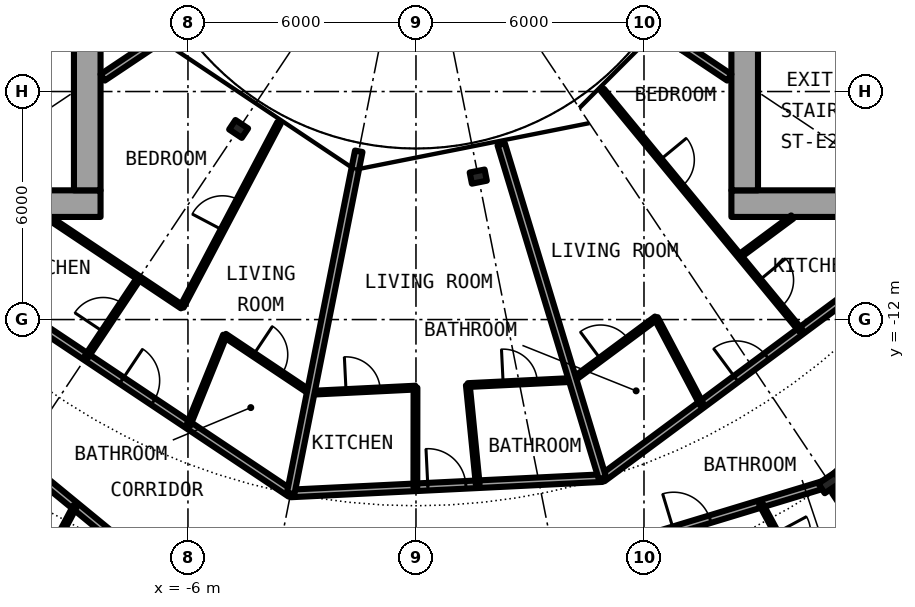
"""IFC4 building model, lengths in metres.
Left out: names, types, materials, properties, quantities, classifications, styles, units other than length and angle.
Written with IfcOpenShell. Run it as: python <this file> out.ifc"""

import sys

from ifc_helpers import new_model, si_unit, direction, frame, frame_2d, origin, origin_2d, place, context, subcontext, project, spatial, rectangle, i_section, extrude, element, fill, save


model = new_model("IFC4")
c1 = context("Model", 3, precision=1e-05, world=origin(), true_north=direction((0.0, 1.0)))
c2 = subcontext(c1, "Body", "Model", "MODEL_VIEW")
j1 = project(units=[si_unit("LENGTHUNIT", "METRE"), si_unit("PLANEANGLEUNIT", "RADIAN")], contexts=[c1])
p1 = place(None, origin())
s1 = spatial("IfcSite", under=j1, at=p1, CompositionType="ELEMENT")
p2 = place(p1, origin())
s2 = spatial("IfcBuilding", under=s1, at=p2, CompositionType="ELEMENT")
p3 = place(p2, frame((0.0, 0.0, 91.05)))
s3 = spatial("IfcBuildingStorey", under=s2, at=p3, CompositionType="ELEMENT", Elevation=91.05)
p4 = place(p3, frame((10.889, -16.297, 0.0), z_axis=(0.0, 0.0, 1.0), x_axis=(0.55557023302, -0.831469612303, 0.0)))
e1 = element("IfcColumn", 1, at=p4, inside=s3, PredefinedType="COLUMN", context=c2, shape_type="SweptSolid", body=[
    extrude(i_section(OverallWidth=0.306, OverallDepth=0.524, WebThickness=0.021, FlangeThickness=0.04, FilletRadius=0.027, at=origin_2d()), origin(), (0.0, 0.0, 1.0), 3.05),
])
for number, where, z_axis, x_axis in (
    (2, (-4.667, -6.984, 0.0), (0.0, 0.0, 1.0), (-0.556, -0.831, 0.0)),
    (3, (1.639, -8.239, 0.0), (0.0, 0.0, 1.0), (0.195, -0.981, 0.0)),
):
    element("IfcColumn", number, at=place(p3, frame(where, z_axis=z_axis, x_axis=x_axis)), inside=s3, PredefinedType="COLUMN", context=c2, shape_type="SweptSolid", body=[
        extrude(i_section(OverallWidth=0.3, OverallDepth=0.4, WebThickness=0.013, FlangeThickness=0.024, FilletRadius=0.027, at=origin_2d()), origin(), (0.0, 0.0, 1.0), 3.05),
    ])
p5 = place(p3, frame((8.3, -8.95, 0.0), z_axis=(0.0, 0.0, 1.0), x_axis=(1.0, 0.0, 0.0)))
e4 = element("IfcWall", 4, at=p5, inside=s3, PredefinedType="SHEAR", context=c2, shape_type="SweptSolid", body=[
    extrude(rectangle(XDim=14.0, YDim=0.7, at=frame_2d((7.0, 0.0))), origin(), (0.0, 0.0, 1.0), 3.05),
])
p6 = place(p5, frame((11.575, 0.0, 0.0)))
e5 = element("IfcOpeningElement", 5, at=p6, cuts=e4, PredefinedType="OPENING", context=c2, shape_type="SweptSolid", body=[
    extrude(rectangle(XDim=1.2, YDim=2.3, at=frame_2d((0.6, 1.15))), frame((0.0, 0.36, 0.0), z_axis=(0.0, -1.0, 0.0), x_axis=(1.0, 0.0, 0.0)), (0.0, 0.0, 1.0), 0.72),
])
p7 = place(p3, frame((8.65, -8.6, 0.0), z_axis=(0.0, 0.0, 1.0), x_axis=(0.0, 1.0, 0.0)))
e6 = element("IfcWall", 6, at=p7, inside=s3, PredefinedType="SHEAR", context=c2, shape_type="SweptSolid", body=[
    extrude(rectangle(XDim=17.2, YDim=0.7, at=frame_2d((8.6, 0.0))), origin(), (0.0, 0.0, 1.0), 3.05),
])
p8 = place(p7, frame((7.4, 0.0, 0.1)))
e7 = element("IfcOpeningElement", 7, at=p8, cuts=e6, PredefinedType="OPENING", context=c2, shape_type="SweptSolid", body=[
    extrude(rectangle(XDim=2.4, YDim=2.2, at=frame_2d((1.2, 1.1))), frame((0.0, 0.36, 0.0), z_axis=(0.0, -1.0, 0.0), x_axis=(1.0, 0.0, 0.0)), (0.0, 0.0, 1.0), 0.72),
])
p9 = place(p3, frame((-22.3, -8.95, 0.0), z_axis=(0.0, 0.0, 1.0), x_axis=(1.0, 0.0, 0.0)))
e8 = element("IfcWall", 8, at=p9, inside=s3, PredefinedType="SHEAR", context=c2, shape_type="SweptSolid", body=[
    extrude(rectangle(XDim=14.0, YDim=0.7, at=frame_2d((7.0, 0.0))), origin(), (0.0, 0.0, 1.0), 3.05),
])
p10 = place(p9, frame((1.225, 0.0, 0.0)))
e9 = element("IfcOpeningElement", 9, at=p10, cuts=e8, PredefinedType="OPENING", context=c2, shape_type="SweptSolid", body=[
    extrude(rectangle(XDim=1.2, YDim=2.3, at=frame_2d((0.6, 1.15))), frame((0.0, 0.36, 0.0), z_axis=(0.0, -1.0, 0.0), x_axis=(1.0, 0.0, 0.0)), (0.0, 0.0, 1.0), 0.72),
])
p11 = place(p3, frame((-8.65, 8.6, 0.0), z_axis=(0.0, 0.0, 1.0), x_axis=(0.0, -1.0, 0.0)))
e10 = element("IfcWall", 10, at=p11, inside=s3, PredefinedType="SHEAR", context=c2, shape_type="SweptSolid", body=[
    extrude(rectangle(XDim=17.2, YDim=0.7, at=frame_2d((8.6, 0.0))), origin(), (0.0, 0.0, 1.0), 3.05),
])
p12 = place(p11, frame((7.4, 0.0, 0.1)))
e11 = element("IfcOpeningElement", 11, at=p12, cuts=e10, PredefinedType="OPENING", context=c2, shape_type="SweptSolid", body=[
    extrude(rectangle(XDim=2.4, YDim=2.2, at=frame_2d((1.2, 1.1))), frame((0.0, 0.36, 0.0), z_axis=(0.0, -1.0, 0.0), x_axis=(1.0, 0.0, 0.0)), (0.0, 0.0, 1.0), 0.72),
])
p13 = place(p3, frame((11.0, -16.186, 0.0), z_axis=(0.0, 0.0, 1.0), x_axis=(0.707106781187, 0.707106781187, 0.0)))
e12 = element("IfcWall", 12, at=p13, inside=s3, PredefinedType="PARTITIONING", context=c2, shape_type="SweptSolid", body=[
    extrude(rectangle(XDim=7.334, YDim=0.2, at=frame_2d((3.667, 0.0))), origin(), (0.0, 0.0, 1.0), 2.38),
])
p14 = place(p13, frame((4.123, 0.0, 0.0)))
e13 = element("IfcOpeningElement", 13, at=p14, cuts=e12, PredefinedType="OPENING", context=c2, shape_type="SweptSolid", body=[
    extrude(rectangle(XDim=1.0, YDim=2.3, at=frame_2d((0.5, 1.15))), frame((0.0, 0.11, 0.0), z_axis=(0.0, -1.0, 0.0), x_axis=(1.0, 0.0, 0.0)), (0.0, 0.0, 1.0), 0.22),
])
p15 = place(p3, frame((-16.173, -10.991, 0.0), z_axis=(0.0, 0.0, 1.0), x_axis=(0.773013989296, -0.634388975591, 0.0)))
e14 = element("IfcWall", 14, at=p15, inside=s3, PredefinedType="PARTITIONING", context=c2, shape_type="SweptSolid", body=[
    extrude(rectangle(XDim=11.219, YDim=0.2, at=frame_2d((5.609, 0.0))), origin(), (0.0, 0.0, 1.0), 2.38),
])
p16 = place(p15, frame((6.278, 0.0, 0.0)))
e15 = element("IfcOpeningElement", 15, at=p16, cuts=e14, PredefinedType="OPENING", context=c2, shape_type="SweptSolid", body=[
    extrude(rectangle(XDim=1.0, YDim=2.3, at=frame_2d((0.5, 1.15))), frame((0.0, 0.11, 0.0), z_axis=(0.0, -1.0, 0.0), x_axis=(1.0, 0.0, 0.0)), (0.0, 0.0, 1.0), 0.22),
])
p17 = place(p3, frame((0.0, -19.6, 0.0), z_axis=(0.0, 0.0, 1.0), x_axis=(0.956932298225, 0.290311172044, 0.0)))
e16 = element("IfcWall", 16, at=p17, inside=s3, PredefinedType="PARTITIONING", context=c2, shape_type="SweptSolid", body=[
    extrude(rectangle(XDim=11.219, YDim=0.2, at=frame_2d((5.61, 0.0))), origin(), (0.0, 0.0, 1.0), 2.38),
])
p18 = place(p17, frame((7.086, 0.0, 0.0)))
e17 = element("IfcOpeningElement", 17, at=p18, cuts=e16, PredefinedType="OPENING", context=c2, shape_type="SweptSolid", body=[
    extrude(rectangle(XDim=1.0, YDim=2.3, at=frame_2d((0.5, 1.15))), frame((0.0, 0.11, 0.0), z_axis=(0.0, -1.0, 0.0), x_axis=(1.0, 0.0, 0.0)), (0.0, 0.0, 1.0), 0.22),
])
p19 = place(p3, frame((-3.297, -16.575, 0.0), z_axis=(0.0, 0.0, 1.0), x_axis=(0.998796706656, 0.0490422142, 0.0)))
e18 = element("IfcWall", 18, at=p19, inside=s3, PredefinedType="PARTITIONING", context=c2, shape_type="SweptSolid", body=[
    extrude(rectangle(XDim=8.214, YDim=0.2, at=frame_2d((4.107, 0.0))), origin(), (0.0, 0.0, 1.0), 2.7),
])
p20 = place(p19, frame((3.614, 0.0, 0.0)))
e19 = element("IfcOpeningElement", 19, at=p20, cuts=e18, PredefinedType="OPENING", context=c2, shape_type="SweptSolid", body=[
    extrude(rectangle(XDim=1.0, YDim=2.3, at=frame_2d((0.5, 1.15))), frame((0.0, 0.11, 0.0), z_axis=(0.0, -1.0, 0.0), x_axis=(1.0, 0.0, 0.0)), (0.0, 0.0, 1.0), 0.22),
])
p21 = place(p3, frame((4.906, -16.172, 0.0), z_axis=(0.0, 0.0, 1.0), x_axis=(0.803191461888, 0.595720971219, 0.0)))
e20 = element("IfcWall", 20, at=p21, inside=s3, PredefinedType="PARTITIONING", context=c2, shape_type="SweptSolid", body=[
    extrude(rectangle(XDim=9.76, YDim=0.2, at=frame_2d((4.88, 0.0))), origin(), (0.0, 0.0, 1.0), 2.7),
])
p22 = place(p21, frame((4.38, 0.0, 0.0)))
e21 = element("IfcOpeningElement", 21, at=p22, cuts=e20, PredefinedType="OPENING", context=c2, shape_type="SweptSolid", body=[
    extrude(rectangle(XDim=1.0, YDim=2.3, at=frame_2d((0.5, 1.15))), frame((0.0, 0.11, 0.0), z_axis=(0.0, -1.0, 0.0), x_axis=(1.0, 0.0, 0.0)), (0.0, 0.0, 1.0), 0.22),
])
p23 = place(p3, frame((-12.706, -10.291, 0.0), z_axis=(0.0, 0.0, 1.0), x_axis=(0.831588572532, -0.555392155178, 0.0)))
e22 = element("IfcWall", 22, at=p23, inside=s3, PredefinedType="PARTITIONING", context=c2, shape_type="SweptSolid", body=[
    extrude(rectangle(XDim=11.314, YDim=0.2, at=frame_2d((5.657, 0.0))), origin(), (0.0, 0.0, 1.0), 2.7),
])
p24 = place(p23, frame((5.966, 0.0, 0.0)))
e23 = element("IfcOpeningElement", 23, at=p24, cuts=e22, PredefinedType="OPENING", context=c2, shape_type="SweptSolid", body=[
    extrude(rectangle(XDim=1.0, YDim=2.3, at=frame_2d((0.5, 1.15))), frame((0.0, 0.11, 0.0), z_axis=(0.0, -1.0, 0.0), x_axis=(1.0, 0.0, 0.0)), (0.0, 0.0, 1.0), 0.22),
])
p25 = place(p3, frame((-2.772, -13.927, 0.0), z_axis=(0.0, 0.0, 1.0), x_axis=(0.998787571158, 0.04922791586, 0.0)))
e24 = element("IfcWall", 24, at=p25, inside=s3, PredefinedType="PARTITIONING", context=c2, shape_type="SweptSolid", body=[
    extrude(rectangle(XDim=2.762, YDim=0.1, at=frame_2d((1.381, 0.0))), origin(), (0.0, 0.0, 1.0), 2.7),
])
p26 = place(p25, frame((0.933, 0.0, 0.0)))
e25 = element("IfcOpeningElement", 25, at=p26, cuts=e24, PredefinedType="OPENING", context=c2, shape_type="SweptSolid", body=[
    extrude(rectangle(XDim=0.9, YDim=2.3, at=frame_2d((0.45, 1.15))), frame((0.0, 0.06, 0.0), z_axis=(0.0, -1.0, 0.0), x_axis=(1.0, 0.0, 0.0)), (0.0, 0.0, 1.0), 0.12),
])
p27 = place(p3, frame((1.365, -13.724, 0.0), z_axis=(0.0, 0.0, 1.0), x_axis=(0.99880320044, 0.048909782152, 0.0)))
e26 = element("IfcWall", 26, at=p27, inside=s3, PredefinedType="PARTITIONING", context=c2, shape_type="SweptSolid", body=[
    extrude(rectangle(XDim=2.76, YDim=0.1, at=frame_2d((1.38, 0.0))), origin(), (0.0, 0.0, 1.0), 2.7),
])
p28 = place(p27, frame((0.93, 0.0, 0.0)))
e27 = element("IfcOpeningElement", 27, at=p28, cuts=e26, PredefinedType="OPENING", context=c2, shape_type="SweptSolid", body=[
    extrude(rectangle(XDim=0.9, YDim=2.3, at=frame_2d((0.45, 1.15))), frame((0.0, 0.06, 0.0), z_axis=(0.0, -1.0, 0.0), x_axis=(1.0, 0.0, 0.0)), (0.0, 0.0, 1.0), 0.12),
])
p29 = place(p3, frame((4.123, -13.589, 0.0), z_axis=(0.0, 0.0, 1.0), x_axis=(0.803128348509, 0.595806055542, 0.0)))
e28 = element("IfcWall", 28, at=p29, inside=s3, PredefinedType="PARTITIONING", context=c2, shape_type="SweptSolid", body=[
    extrude(rectangle(XDim=2.734, YDim=0.1, at=frame_2d((1.367, 0.0))), origin(), (0.0, 0.0, 1.0), 2.7),
])
p30 = place(p29, frame((0.916, 0.0, 0.0)))
e29 = element("IfcOpeningElement", 29, at=p30, cuts=e28, PredefinedType="OPENING", context=c2, shape_type="SweptSolid", body=[
    extrude(rectangle(XDim=0.9, YDim=2.3, at=frame_2d((0.45, 1.15))), frame((0.0, 0.06, 0.0), z_axis=(0.0, -1.0, 0.0), x_axis=(1.0, 0.0, 0.0)), (0.0, 0.0, 1.0), 0.12),
])
p31 = place(p3, frame((8.513, -10.332, 0.0), z_axis=(0.0, 0.0, 1.0), x_axis=(0.803135014325, 0.595797070121, 0.0)))
e30 = element("IfcWall", 30, at=p31, inside=s3, PredefinedType="PARTITIONING", context=c2, shape_type="SweptSolid", body=[
    extrude(rectangle(XDim=1.732, YDim=0.1, at=frame_2d((0.866, 0.0))), origin(), (0.0, 0.0, 1.0), 2.7),
])
p32 = place(p3, frame((-9.693, -9.302, 0.0), z_axis=(0.0, 0.0, 1.0), x_axis=(0.831546497949, -0.555455148278, 0.0)))
e31 = element("IfcWall", 31, at=p32, inside=s3, PredefinedType="PARTITIONING", context=c2, shape_type="SweptSolid", body=[
    extrude(rectangle(XDim=4.252, YDim=0.1, at=frame_2d((2.126, 0.0))), origin(), (0.0, 0.0, 1.0), 2.7),
])
p33 = place(p3, frame((-5.029, -12.418, 0.0), z_axis=(0.0, 0.0, 1.0), x_axis=(0.831538390496, -0.555467285384, 0.0)))
e32 = element("IfcWall", 32, at=p33, inside=s3, PredefinedType="PARTITIONING", context=c2, shape_type="SweptSolid", body=[
    extrude(rectangle(XDim=2.717, YDim=0.1, at=frame_2d((1.358, 0.0))), origin(), (0.0, 0.0, 1.0), 2.7),
])
p34 = place(p33, frame((0.908, 0.0, 0.0)))
e33 = element("IfcOpeningElement", 33, at=p34, cuts=e32, PredefinedType="OPENING", context=c2, shape_type="SweptSolid", body=[
    extrude(rectangle(XDim=0.9, YDim=2.3, at=frame_2d((0.45, 1.15))), frame((0.0, 0.06, 0.0), z_axis=(0.0, -1.0, 0.0), x_axis=(1.0, 0.0, 0.0)), (0.0, 0.0, 1.0), 0.12),
])
for number, where, z_axis, x_axis in (
    (34, (-6.513, -4.472, 0.0), (0.0, 0.0, 1.0), (-0.831, -0.556, 0.0)),
    (35, (6.513, -4.472, 0.0), (0.0, 0.0, 1.0), (0.831, -0.556, 0.0)),
):
    element("IfcWall", number, at=place(p3, frame(where, z_axis=z_axis, x_axis=x_axis)), inside=s3, PredefinedType="PARTITIONING", context=c2, shape_type="SweptSolid", body=[
        extrude(rectangle(XDim=2.082, YDim=0.2, at=frame_2d((1.041, 0.0))), origin(), (0.0, 0.0, 1.0), 2.7),
    ])
p35 = place(p3, frame((-10.202, -19.234, 0.0), z_axis=(0.0, 0.0, 1.0), x_axis=(0.468462103808, 0.883483591979, 0.0)))
e36 = element("IfcWall", 36, at=p35, inside=s3, PredefinedType="PARTITIONING", context=c2, shape_type="SweptSolid", body=[
    extrude(rectangle(XDim=2.636, YDim=0.1, at=frame_2d((1.318, 0.0))), origin(), (0.0, 0.0, 1.0), 2.7),
])
p36 = place(p35, frame((0.868, 0.0, 0.0)))
e37 = element("IfcOpeningElement", 37, at=p36, cuts=e36, PredefinedType="OPENING", context=c2, shape_type="SweptSolid", body=[
    extrude(rectangle(XDim=0.9, YDim=2.3, at=frame_2d((0.45, 1.15))), frame((0.0, 0.06, 0.0), z_axis=(0.0, -1.0, 0.0), x_axis=(1.0, 0.0, 0.0)), (0.0, 0.0, 1.0), 0.12),
])
p37 = place(p3, frame((-8.674, -12.982, 0.0), z_axis=(0.0, 0.0, 1.0), x_axis=(0.555355163998, 0.831613276602, 0.0)))
e38 = element("IfcWall", 38, at=p37, inside=s3, PredefinedType="PARTITIONING", context=c2, shape_type="SweptSolid", body=[
    extrude(rectangle(XDim=2.494, YDim=0.1, at=frame_2d((1.247, 0.0))), origin(), (0.0, 0.0, 1.0), 2.7),
])
p38 = place(p37, frame((0.797, 0.0, 0.0)))
e39 = element("IfcOpeningElement", 39, at=p38, cuts=e38, PredefinedType="OPENING", context=c2, shape_type="SweptSolid", body=[
    extrude(rectangle(XDim=0.9, YDim=2.3, at=frame_2d((0.45, 1.15))), frame((0.0, 0.06, 0.0), z_axis=(0.0, -1.0, 0.0), x_axis=(1.0, 0.0, 0.0)), (0.0, 0.0, 1.0), 0.12),
])
p39 = place(p3, frame((-6.158, -11.663, 0.0), z_axis=(0.0, 0.0, 1.0), x_axis=(0.466976820365, 0.884269556889, 0.0)))
e40 = element("IfcWall", 40, at=p39, inside=s3, PredefinedType="PARTITIONING", context=c2, shape_type="SweptSolid", body=[
    extrude(rectangle(XDim=5.469, YDim=0.1, at=frame_2d((2.735, 0.0))), origin(), (0.0, 0.0, 1.0), 2.7),
])
p40 = place(p39, frame((2.284, 0.0, 0.0)))
e41 = element("IfcOpeningElement", 41, at=p40, cuts=e40, PredefinedType="OPENING", context=c2, shape_type="SweptSolid", body=[
    extrude(rectangle(XDim=0.9, YDim=2.3, at=frame_2d((0.45, 1.15))), frame((0.0, 0.06, 0.0), z_axis=(0.0, -1.0, 0.0), x_axis=(1.0, 0.0, 0.0)), (0.0, 0.0, 1.0), 0.12),
])
p41 = place(p3, frame((-5.986, -14.779, 0.0), z_axis=(0.0, 0.0, 1.0), x_axis=(0.375649498413, 0.926761811008, 0.0)))
e42 = element("IfcWall", 42, at=p41, inside=s3, PredefinedType="PARTITIONING", context=c2, shape_type="SweptSolid", body=[
    extrude(rectangle(XDim=2.548, YDim=0.1, at=frame_2d((1.274, 0.0))), origin(), (0.0, 0.0, 1.0), 2.7),
])
p42 = place(p3, frame((-3.297, -16.575, 0.0), z_axis=(0.0, 0.0, 1.0), x_axis=(0.19511354088, 0.980780661598, 0.0)))
e43 = element("IfcWall", 43, at=p42, inside=s3, PredefinedType="PARTITIONING", context=c2, shape_type="SweptSolid", body=[
    extrude(rectangle(XDim=9.179, YDim=0.2, at=frame_2d((4.59, 0.0))), origin(), (0.0, 0.0, 1.0), 2.7),
])
p43 = place(p3, frame((-0.016, -16.414, 0.0), z_axis=(0.0, 0.0, 1.0), x_axis=(0.001210427419, 0.999999267432, 0.0)))
e44 = element("IfcWall", 44, at=p43, inside=s3, PredefinedType="PARTITIONING", context=c2, shape_type="SweptSolid", body=[
    extrude(rectangle(XDim=2.622, YDim=0.1, at=frame_2d((1.311, 0.0))), origin(), (0.0, 0.0, 1.0), 2.7),
])
p44 = place(p3, frame((1.365, -13.724, 0.0), z_axis=(0.0, 0.0, 1.0), x_axis=(0.099171803948, -0.995070325807, 0.0)))
e45 = element("IfcWall", 45, at=p44, inside=s3, PredefinedType="PARTITIONING", context=c2, shape_type="SweptSolid", body=[
    extrude(rectangle(XDim=2.622, YDim=0.1, at=frame_2d((1.311, 0.0))), origin(), (0.0, 0.0, 1.0), 2.7),
])
p45 = place(p3, frame((2.242, -7.388, 0.0), z_axis=(0.0, 0.0, 1.0), x_axis=(0.290225889812, -0.956958166736, 0.0)))
e46 = element("IfcWall", 46, at=p45, inside=s3, PredefinedType="PARTITIONING", context=c2, shape_type="SweptSolid", body=[
    extrude(rectangle(XDim=9.179, YDim=0.2, at=frame_2d((4.59, 0.0))), origin(), (0.0, 0.0, 1.0), 2.7),
])
p46 = place(p3, frame((4.908, -5.959, 0.0), z_axis=(0.0, 0.0, 1.0), x_axis=(0.636105207978, -0.771602335652, 0.0)))
e47 = element("IfcWall", 47, at=p46, inside=s3, PredefinedType="PARTITIONING", context=c2, shape_type="SweptSolid", body=[
    extrude(rectangle(XDim=8.213, YDim=0.1, at=frame_2d((4.106, 0.0))), origin(), (0.0, 0.0, 1.0), 2.7),
])
p47 = place(p46, frame((6.49, 0.0, 0.0)))
e48 = element("IfcOpeningElement", 48, at=p47, cuts=e47, PredefinedType="OPENING", context=c2, shape_type="SweptSolid", body=[
    extrude(rectangle(XDim=0.9, YDim=2.3, at=frame_2d((0.45, 1.15))), frame((0.0, 0.06, 0.0), z_axis=(0.0, -1.0, 0.0), x_axis=(1.0, 0.0, 0.0)), (0.0, 0.0, 1.0), 0.12),
])
p48 = place(p46, frame((2.384, 0.0, 0.0)))
e49 = element("IfcOpeningElement", 49, at=p48, cuts=e47, PredefinedType="OPENING", context=c2, shape_type="SweptSolid", body=[
    extrude(rectangle(XDim=0.9, YDim=2.3, at=frame_2d((0.45, 1.15))), frame((0.0, 0.06, 0.0), z_axis=(0.0, -1.0, 0.0), x_axis=(1.0, 0.0, 0.0)), (0.0, 0.0, 1.0), 0.12),
])
p49 = place(p3, frame((6.317, -11.96, 0.0), z_axis=(0.0, 0.0, 1.0), x_axis=(0.466880254022, -0.884320546185, 0.0)))
e50 = element("IfcWall", 50, at=p49, inside=s3, PredefinedType="PARTITIONING", context=c2, shape_type="SweptSolid", body=[
    extrude(rectangle(XDim=2.573, YDim=0.1, at=frame_2d((1.286, 0.0))), origin(), (0.0, 0.0, 1.0), 2.7),
])
p50 = place(p3, frame((9.074, -16.847, 0.0), z_axis=(0.0, 0.0, 1.0), x_axis=(0.474160570331, -0.880438387136, 0.0)))
e51 = element("IfcWall", 51, at=p50, inside=s3, PredefinedType="PARTITIONING", context=c2, shape_type="SweptSolid", body=[
    extrude(rectangle(XDim=2.636, YDim=0.1, at=frame_2d((1.318, 0.0))), origin(), (0.0, 0.0, 1.0), 2.7),
])
p51 = place(p50, frame((0.868, 0.0, 0.0)))
e52 = element("IfcOpeningElement", 52, at=p51, cuts=e51, PredefinedType="OPENING", context=c2, shape_type="SweptSolid", body=[
    extrude(rectangle(XDim=0.9, YDim=2.3, at=frame_2d((0.45, 1.15))), frame((0.0, 0.06, 0.0), z_axis=(0.0, -1.0, 0.0), x_axis=(1.0, 0.0, 0.0)), (0.0, 0.0, 1.0), 0.12),
])
p52 = place(p3, frame((11.034, -16.515, 0.0), z_axis=(0.0, 0.0, 1.0), x_axis=(0.555701298605, -0.831382022135, 0.0)))
e53 = element("IfcWall", 53, at=p52, inside=s3, PredefinedType="PARTITIONING", context=c2, shape_type="SweptSolid", body=[
    extrude(rectangle(XDim=7.313, YDim=0.2, at=frame_2d((3.657, 0.0))), origin(), (0.0, 0.0, 1.0), 2.7),
])
p53 = place(p18, origin())
e54 = element("IfcDoor", 54, at=p53, inside=s3, OperationType="SINGLE_SWING_RIGHT", PredefinedType="DOOR", context=c2, shape_type="SweptSolid", body=[
    extrude(rectangle(XDim=1.0, YDim=2.3, at=frame_2d((0.5, 1.15))), frame((0.0, 0.025, 0.0), z_axis=(0.0, -1.0, 0.0), x_axis=(1.0, 0.0, 0.0)), (0.0, 0.0, 1.0), 0.05),
])
fill(e17, e54)
p54 = place(p24, origin())
e55 = element("IfcDoor", 55, at=p54, inside=s3, OperationType="SINGLE_SWING_RIGHT", PredefinedType="DOOR", context=c2, shape_type="SweptSolid", body=[
    extrude(rectangle(XDim=1.0, YDim=2.3, at=frame_2d((0.5, 1.15))), frame((0.0, 0.025, 0.0), z_axis=(0.0, -1.0, 0.0), x_axis=(1.0, 0.0, 0.0)), (0.0, 0.0, 1.0), 0.05),
])
fill(e23, e55)
p55 = place(p34, origin())
e56 = element("IfcDoor", 56, at=p55, inside=s3, OperationType="SINGLE_SWING_LEFT", PredefinedType="DOOR", context=c2, shape_type="SweptSolid", body=[
    extrude(rectangle(XDim=0.9, YDim=2.3, at=frame_2d((0.45, 1.15))), frame((0.0, 0.025, 0.0), z_axis=(0.0, -1.0, 0.0), x_axis=(1.0, 0.0, 0.0)), (0.0, 0.0, 1.0), 0.05),
])
fill(e33, e56)
p56 = place(p38, origin())
e57 = element("IfcDoor", 57, at=p56, inside=s3, OperationType="SINGLE_SWING_RIGHT", PredefinedType="DOOR", context=c2, shape_type="SweptSolid", body=[
    extrude(rectangle(XDim=0.9, YDim=2.3, at=frame_2d((0.45, 1.15))), frame((0.0, 0.025, 0.0), z_axis=(0.0, -1.0, 0.0), x_axis=(1.0, 0.0, 0.0)), (0.0, 0.0, 1.0), 0.05),
])
fill(e39, e57)
p57 = place(p40, origin())
e58 = element("IfcDoor", 58, at=p57, inside=s3, OperationType="SINGLE_SWING_LEFT", PredefinedType="DOOR", context=c2, shape_type="SweptSolid", body=[
    extrude(rectangle(XDim=0.9, YDim=2.3, at=frame_2d((0.45, 1.15))), frame((0.0, 0.025, 0.0), z_axis=(0.0, -1.0, 0.0), x_axis=(1.0, 0.0, 0.0)), (0.0, 0.0, 1.0), 0.05),
])
fill(e41, e58)
p58 = place(p20, origin())
e59 = element("IfcDoor", 59, at=p58, inside=s3, OperationType="SINGLE_SWING_RIGHT", PredefinedType="DOOR", context=c2, shape_type="SweptSolid", body=[
    extrude(rectangle(XDim=1.0, YDim=2.3, at=frame_2d((0.5, 1.15))), frame((0.0, 0.025, 0.0), z_axis=(0.0, -1.0, 0.0), x_axis=(1.0, 0.0, 0.0)), (0.0, 0.0, 1.0), 0.05),
])
fill(e19, e59)
p59 = place(p28, origin())
e60 = element("IfcDoor", 60, at=p59, inside=s3, OperationType="SINGLE_SWING_RIGHT", PredefinedType="DOOR", context=c2, shape_type="SweptSolid", body=[
    extrude(rectangle(XDim=0.9, YDim=2.3, at=frame_2d((0.45, 1.15))), frame((0.0, 0.025, 0.0), z_axis=(0.0, -1.0, 0.0), x_axis=(1.0, 0.0, 0.0)), (0.0, 0.0, 1.0), 0.05),
])
fill(e27, e60)
p60 = place(p26, origin())
e61 = element("IfcDoor", 61, at=p60, inside=s3, OperationType="SINGLE_SWING_RIGHT", PredefinedType="DOOR", context=c2, shape_type="SweptSolid", body=[
    extrude(rectangle(XDim=0.9, YDim=2.3, at=frame_2d((0.45, 1.15))), frame((0.0, 0.025, 0.0), z_axis=(0.0, -1.0, 0.0), x_axis=(1.0, 0.0, 0.0)), (0.0, 0.0, 1.0), 0.05),
])
fill(e25, e61)
p61 = place(p22, origin())
e62 = element("IfcDoor", 62, at=p61, inside=s3, OperationType="SINGLE_SWING_LEFT", PredefinedType="DOOR", context=c2, shape_type="SweptSolid", body=[
    extrude(rectangle(XDim=1.0, YDim=2.3, at=frame_2d((0.5, 1.15))), frame((0.0, 0.025, 0.0), z_axis=(0.0, -1.0, 0.0), x_axis=(1.0, 0.0, 0.0)), (0.0, 0.0, 1.0), 0.05),
])
fill(e21, e62)
p62 = place(p30, origin())
e63 = element("IfcDoor", 63, at=p62, inside=s3, OperationType="SINGLE_SWING_LEFT", PredefinedType="DOOR", context=c2, shape_type="SweptSolid", body=[
    extrude(rectangle(XDim=0.9, YDim=2.3, at=frame_2d((0.45, 1.15))), frame((0.0, 0.025, 0.0), z_axis=(0.0, -1.0, 0.0), x_axis=(1.0, 0.0, 0.0)), (0.0, 0.0, 1.0), 0.05),
])
fill(e29, e63)
p63 = place(p47, origin())
e64 = element("IfcDoor", 64, at=p63, inside=s3, OperationType="SINGLE_SWING_RIGHT", PredefinedType="DOOR", context=c2, shape_type="SweptSolid", body=[
    extrude(rectangle(XDim=0.9, YDim=2.3, at=frame_2d((0.45, 1.15))), frame((0.0, 0.025, 0.0), z_axis=(0.0, -1.0, 0.0), x_axis=(1.0, 0.0, 0.0)), (0.0, 0.0, 1.0), 0.05),
])
fill(e48, e64)
p64 = place(p48, origin())
e65 = element("IfcDoor", 65, at=p64, inside=s3, OperationType="SINGLE_SWING_LEFT", PredefinedType="DOOR", context=c2, shape_type="SweptSolid", body=[
    extrude(rectangle(XDim=0.9, YDim=2.3, at=frame_2d((0.45, 1.15))), frame((0.0, 0.025, 0.0), z_axis=(0.0, -1.0, 0.0), x_axis=(1.0, 0.0, 0.0)), (0.0, 0.0, 1.0), 0.05),
])
fill(e49, e65)
save(model, sys.argv[1])
